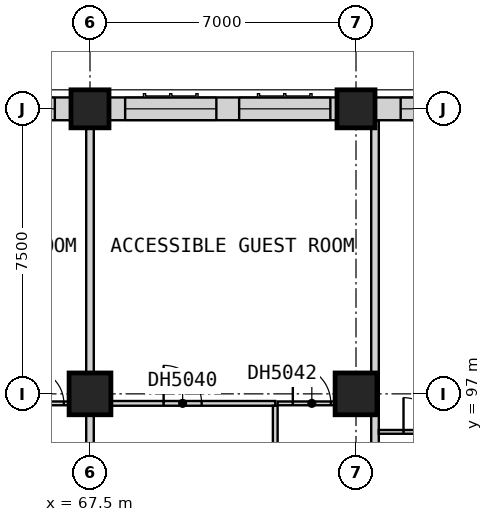
"""IFC4 building model, lengths in metres.
Left out: names, types, materials, properties, quantities, classifications, styles, units other than length and angle.
Written with IfcOpenShell. Run it as: python <this file> out.ifc"""

import sys

from ifc_helpers import new_model, si_unit, direction, frame, frame_2d, origin, origin_2d, place, context, subcontext, project, spatial, rectangle, extrude, element, fill, save


model = new_model("IFC4")
c1 = context("Model", 3, precision=1e-05, world=origin(), true_north=direction((0.0, 1.0)))
c2 = subcontext(c1, "Body", "Model", "MODEL_VIEW")
j1 = project(units=[si_unit("LENGTHUNIT", "METRE"), si_unit("PLANEANGLEUNIT", "RADIAN")], contexts=[c1])
p1 = place(None, origin())
s1 = spatial("IfcSite", under=j1, at=p1, CompositionType="ELEMENT")
p2 = place(p1, origin())
s2 = spatial("IfcBuilding", under=s1, at=p2, CompositionType="ELEMENT")
p3 = place(p2, frame((0.0, 0.0, 93.5)))
s3 = spatial("IfcBuildingStorey", under=s2, at=p3, CompositionType="ELEMENT", Elevation=93.5)
p4 = place(p3, frame((67.5, 97.0, 0.0), z_axis=(0.0, 0.0, 1.0), x_axis=(1.0, 0.0, 0.0)))
e1 = element("IfcColumn", 1, at=p4, inside=s3, PredefinedType="COLUMN", context=c2, shape_type="SweptSolid", body=[
    extrude(rectangle(XDim=1.1, YDim=1.1, at=origin_2d()), origin(), (0.0, 0.0, 1.0), 3.6),
])
p5 = place(p3, frame((67.5, 104.5, 0.0), z_axis=(0.0, 0.0, 1.0), x_axis=(1.0, 0.0, 0.0)))
e2 = element("IfcColumn", 2, at=p5, inside=s3, PredefinedType="COLUMN", context=c2, shape_type="SweptSolid", body=[
    extrude(rectangle(XDim=1.0, YDim=1.0, at=origin_2d()), origin(), (0.0, 0.0, 1.0), 3.6),
])
p6 = place(p3, frame((74.5, 97.0, 0.0), z_axis=(0.0, 0.0, 1.0), x_axis=(1.0, 0.0, 0.0)))
e3 = element("IfcColumn", 3, at=p6, inside=s3, PredefinedType="COLUMN", context=c2, shape_type="SweptSolid", body=[
    extrude(rectangle(XDim=1.1, YDim=1.1, at=origin_2d()), origin(), (0.0, 0.0, 1.0), 3.6),
])
p7 = place(p3, frame((74.5, 104.5, 0.0), z_axis=(0.0, 0.0, 1.0), x_axis=(1.0, 0.0, 0.0)))
e4 = element("IfcColumn", 4, at=p7, inside=s3, PredefinedType="COLUMN", context=c2, shape_type="SweptSolid", body=[
    extrude(rectangle(XDim=1.0, YDim=1.0, at=origin_2d()), origin(), (0.0, 0.0, 1.0), 3.6),
])
p8 = place(p3, frame((81.5, 104.5, 0.0), z_axis=(0.0, 0.0, 1.0), x_axis=(-1.0, 0.0, 0.0)))
e5 = element("IfcWall", 5, at=p8, inside=s3, PredefinedType="SOLIDWALL", context=c2, shape_type="SweptSolid", body=[
    extrude(rectangle(XDim=6.5, YDim=0.6, at=frame_2d((3.25, 0.0))), origin(), (0.0, 0.0, 1.0), 2.85),
])
p9 = place(p8, frame((3.425, 0.0, 0.8)))
e6 = element("IfcOpeningElement", 6, at=p9, cuts=e5, PredefinedType="OPENING", context=c2, shape_type="SweptSolid", body=[
    extrude(rectangle(XDim=2.4, YDim=1.8, at=frame_2d((1.2, 0.9))), frame((0.0, 0.31, 0.0), z_axis=(0.0, -1.0, 0.0), x_axis=(1.0, 0.0, 0.0)), (0.0, 0.0, 1.0), 0.62),
])
p10 = place(p8, frame((0.175, 0.0, 0.8)))
e7 = element("IfcOpeningElement", 7, at=p10, cuts=e5, PredefinedType="OPENING", context=c2, shape_type="SweptSolid", body=[
    extrude(rectangle(XDim=2.4, YDim=1.8, at=frame_2d((1.2, 0.9))), frame((0.0, 0.31, 0.0), z_axis=(0.0, -1.0, 0.0), x_axis=(1.0, 0.0, 0.0)), (0.0, 0.0, 1.0), 0.62),
])
p11 = place(p3, frame((74.0, 104.5, 0.0), z_axis=(0.0, 0.0, 1.0), x_axis=(-1.0, 0.0, 0.0)))
e8 = element("IfcWall", 8, at=p11, inside=s3, PredefinedType="SOLIDWALL", context=c2, shape_type="SweptSolid", body=[
    extrude(rectangle(XDim=6.0, YDim=0.6, at=frame_2d((3.0, 0.0))), origin(), (0.0, 0.0, 1.0), 2.85),
])
p12 = place(p11, frame((3.175, 0.0, 0.8)))
e9 = element("IfcOpeningElement", 9, at=p12, cuts=e8, PredefinedType="OPENING", context=c2, shape_type="SweptSolid", body=[
    extrude(rectangle(XDim=2.4, YDim=1.8, at=frame_2d((1.2, 0.9))), frame((0.0, 0.31, 0.0), z_axis=(0.0, -1.0, 0.0), x_axis=(1.0, 0.0, 0.0)), (0.0, 0.0, 1.0), 0.62),
])
p13 = place(p11, frame((0.175, 0.0, 0.8)))
e10 = element("IfcOpeningElement", 10, at=p13, cuts=e8, PredefinedType="OPENING", context=c2, shape_type="SweptSolid", body=[
    extrude(rectangle(XDim=2.4, YDim=1.8, at=frame_2d((1.2, 0.9))), frame((0.0, 0.31, 0.0), z_axis=(0.0, -1.0, 0.0), x_axis=(1.0, 0.0, 0.0)), (0.0, 0.0, 1.0), 0.62),
])
p14 = place(p3, frame((67.0, 104.5, 0.0), z_axis=(0.0, 0.0, 1.0), x_axis=(-1.0, 0.0, 0.0)))
e11 = element("IfcWall", 11, at=p14, inside=s3, PredefinedType="SOLIDWALL", context=c2, shape_type="SweptSolid", body=[
    extrude(rectangle(XDim=6.5, YDim=0.6, at=frame_2d((3.25, 0.0))), origin(), (0.0, 0.0, 1.0), 2.85),
])
p15 = place(p14, frame((3.675, 0.0, 0.8)))
e12 = element("IfcOpeningElement", 12, at=p15, cuts=e11, PredefinedType="OPENING", context=c2, shape_type="SweptSolid", body=[
    extrude(rectangle(XDim=2.4, YDim=1.8, at=frame_2d((1.2, 0.9))), frame((0.0, 0.31, 0.0), z_axis=(0.0, -1.0, 0.0), x_axis=(1.0, 0.0, 0.0)), (0.0, 0.0, 1.0), 0.62),
])
p16 = place(p14, frame((0.425, 0.0, 0.8)))
e13 = element("IfcOpeningElement", 13, at=p16, cuts=e11, PredefinedType="OPENING", context=c2, shape_type="SweptSolid", body=[
    extrude(rectangle(XDim=2.4, YDim=1.8, at=frame_2d((1.2, 0.9))), frame((0.0, 0.31, 0.0), z_axis=(0.0, -1.0, 0.0), x_axis=(1.0, 0.0, 0.0)), (0.0, 0.0, 1.0), 0.62),
])
p17 = place(p3, frame((67.5, 92.475, 0.0), z_axis=(0.0, 0.0, 1.0), x_axis=(0.0, 1.0, 0.0)))
e14 = element("IfcWall", 14, at=p17, inside=s3, PredefinedType="PARTITIONING", context=c2, shape_type="SweptSolid", body=[
    extrude(rectangle(XDim=12.525, YDim=0.2, at=frame_2d((6.262, 0.0))), origin(), (0.0, 0.0, 1.0), 3.35),
])
p18 = place(p3, frame((75.0, 92.475, 0.0), z_axis=(0.0, 0.0, 1.0), x_axis=(0.0, 1.0, 0.0)))
e15 = element("IfcWall", 15, at=p18, inside=s3, PredefinedType="PARTITIONING", context=c2, shape_type="SweptSolid", body=[
    extrude(rectangle(XDim=11.715, YDim=0.2, at=frame_2d((5.857, 0.0))), origin(), (0.0, 0.0, 1.0), 3.35),
])
p19 = place(p3, frame((75.1, 96.0, 0.0), z_axis=(0.0, 0.0, 1.0), x_axis=(1.0, 0.0, 0.0)))
e16 = element("IfcWall", 16, at=p19, inside=s3, PredefinedType="PARTITIONING", context=c2, shape_type="SweptSolid", body=[
    extrude(rectangle(XDim=7.35, YDim=0.1, at=frame_2d((3.675, 0.0))), origin(), (0.0, 0.0, 1.0), 3.35),
])
p20 = place(p19, frame((0.65, 0.0, 0.0)))
e17 = element("IfcOpeningElement", 17, at=p20, cuts=e16, PredefinedType="OPENING", context=c2, shape_type="SweptSolid", body=[
    extrude(rectangle(XDim=0.9, YDim=2.1, at=frame_2d((0.45, 1.05))), frame((0.0, 0.06, 0.0), z_axis=(0.0, -1.0, 0.0), x_axis=(1.0, 0.0, 0.0)), (0.0, 0.0, 1.0), 0.12),
])
p21 = place(p3, frame((65.688, 96.75, 0.0), z_axis=(0.0, 0.0, 1.0), x_axis=(1.0, 0.0, 0.0)))
e18 = element("IfcWall", 18, at=p21, inside=s3, PredefinedType="PARTITIONING", context=c2, shape_type="SweptSolid", body=[
    extrude(rectangle(XDim=1.712, YDim=0.1, at=frame_2d((0.856, 0.0))), origin(), (0.0, 0.0, 1.0), 3.35),
])
p22 = place(p21, frame((0.225, 0.0, 0.0)))
e19 = element("IfcOpeningElement", 19, at=p22, cuts=e18, PredefinedType="OPENING", context=c2, shape_type="SweptSolid", body=[
    extrude(rectangle(XDim=0.9, YDim=2.1, at=frame_2d((0.45, 1.05))), frame((0.0, 0.06, 0.0), z_axis=(0.0, -1.0, 0.0), x_axis=(1.0, 0.0, 0.0)), (0.0, 0.0, 1.0), 0.12),
])
p23 = place(p3, frame((72.438, 96.75, 0.0), z_axis=(0.0, 0.0, 1.0), x_axis=(1.0, 0.0, 0.0)))
e20 = element("IfcWall", 20, at=p23, inside=s3, PredefinedType="PARTITIONING", context=c2, shape_type="SweptSolid", body=[
    extrude(rectangle(XDim=2.462, YDim=0.1, at=frame_2d((1.231, 0.0))), origin(), (0.0, 0.0, 1.0), 3.35),
])
p24 = place(p23, frame((0.4, 0.0, 0.0)))
e21 = element("IfcOpeningElement", 21, at=p24, cuts=e20, PredefinedType="OPENING", context=c2, shape_type="SweptSolid", body=[
    extrude(rectangle(XDim=1.0, YDim=2.1, at=frame_2d((0.5, 1.05))), frame((0.0, 0.06, 0.0), z_axis=(0.0, -1.0, 0.0), x_axis=(1.0, 0.0, 0.0)), (0.0, 0.0, 1.0), 0.12),
])
p25 = place(p3, frame((67.6, 96.75, 0.0), z_axis=(0.0, 0.0, 1.0), x_axis=(1.0, 0.0, 0.0)))
e22 = element("IfcWall", 22, at=p25, inside=s3, PredefinedType="PARTITIONING", context=c2, shape_type="SweptSolid", body=[
    extrude(rectangle(XDim=4.775, YDim=0.125, at=frame_2d((2.387, 0.0))), origin(), (0.0, 0.0, 1.0), 3.35),
])
p26 = place(p25, frame((1.837, 0.0, 0.0)))
e23 = element("IfcOpeningElement", 23, at=p26, cuts=e22, PredefinedType="OPENING", context=c2, shape_type="SweptSolid", body=[
    extrude(rectangle(XDim=1.0, YDim=2.1, at=frame_2d((0.5, 1.05))), frame((0.0, 0.073, 0.0), z_axis=(0.0, -1.0, 0.0), x_axis=(1.0, 0.0, 0.0)), (0.0, 0.0, 1.0), 0.145),
])
p27 = place(p3, frame((72.375, 92.475, 0.0), z_axis=(0.0, 0.0, 1.0), x_axis=(0.0, 1.0, 0.0)))
e24 = element("IfcWall", 24, at=p27, inside=s3, PredefinedType="PARTITIONING", context=c2, shape_type="SweptSolid", body=[
    extrude(rectangle(XDim=4.212, YDim=0.125, at=frame_2d((2.106, 0.0))), origin(), (0.0, 0.0, 1.0), 3.35),
])
p28 = place(p9, origin())
e25 = element("IfcWindow", 25, at=p28, inside=s3, PartitioningType="SINGLE_PANEL", PredefinedType="WINDOW", context=c2, shape_type="SweptSolid", body=[
    extrude(rectangle(XDim=2.4, YDim=1.8, at=frame_2d((1.2, 0.9))), frame((0.0, -0.07, 0.0), z_axis=(0.0, -1.0, 0.0), x_axis=(1.0, 0.0, 0.0)), (0.0, 0.0, 1.0), 0.06),
])
fill(e6, e25)
p29 = place(p12, origin())
e26 = element("IfcWindow", 26, at=p29, inside=s3, PartitioningType="SINGLE_PANEL", PredefinedType="WINDOW", context=c2, shape_type="SweptSolid", body=[
    extrude(rectangle(XDim=2.4, YDim=1.8, at=frame_2d((1.2, 0.9))), frame((0.0, -0.07, 0.0), z_axis=(0.0, -1.0, 0.0), x_axis=(1.0, 0.0, 0.0)), (0.0, 0.0, 1.0), 0.06),
])
fill(e9, e26)
p30 = place(p13, origin())
e27 = element("IfcWindow", 27, at=p30, inside=s3, PartitioningType="SINGLE_PANEL", PredefinedType="WINDOW", context=c2, shape_type="SweptSolid", body=[
    extrude(rectangle(XDim=2.4, YDim=1.8, at=frame_2d((1.2, 0.9))), frame((0.0, -0.07, 0.0), z_axis=(0.0, -1.0, 0.0), x_axis=(1.0, 0.0, 0.0)), (0.0, 0.0, 1.0), 0.06),
])
fill(e10, e27)
p31 = place(p16, origin())
e28 = element("IfcWindow", 28, at=p31, inside=s3, PartitioningType="SINGLE_PANEL", PredefinedType="WINDOW", context=c2, shape_type="SweptSolid", body=[
    extrude(rectangle(XDim=2.4, YDim=1.8, at=frame_2d((1.2, 0.9))), frame((0.0, -0.07, 0.0), z_axis=(0.0, -1.0, 0.0), x_axis=(1.0, 0.0, 0.0)), (0.0, 0.0, 1.0), 0.06),
])
fill(e13, e28)
p32 = place(p22, origin())
e29 = element("IfcDoor", 29, at=p32, inside=s3, OperationType="SINGLE_SWING_RIGHT", PredefinedType="DOOR", context=c2, shape_type="SweptSolid", body=[
    extrude(rectangle(XDim=0.9, YDim=2.1, at=frame_2d((0.45, 1.05))), frame((0.0, 0.025, 0.0), z_axis=(0.0, -1.0, 0.0), x_axis=(1.0, 0.0, 0.0)), (0.0, 0.0, 1.0), 0.05),
])
fill(e19, e29)
p33 = place(p26, origin())
e30 = element("IfcDoor", 30, at=p33, inside=s3, OperationType="SINGLE_SWING_RIGHT", PredefinedType="DOOR", context=c2, shape_type="SweptSolid", body=[
    extrude(rectangle(XDim=1.0, YDim=2.1, at=frame_2d((0.5, 1.05))), frame((0.0, 0.025, 0.0), z_axis=(0.0, -1.0, 0.0), x_axis=(1.0, 0.0, 0.0)), (0.0, 0.0, 1.0), 0.05),
])
fill(e23, e30)
p34 = place(p24, origin())
e31 = element("IfcDoor", 31, at=p34, inside=s3, OperationType="SINGLE_SWING_RIGHT", PredefinedType="DOOR", context=c2, shape_type="SweptSolid", body=[
    extrude(rectangle(XDim=1.0, YDim=2.1, at=frame_2d((0.5, 1.05))), frame((0.0, 0.025, 0.0), z_axis=(0.0, -1.0, 0.0), x_axis=(1.0, 0.0, 0.0)), (0.0, 0.0, 1.0), 0.05),
])
fill(e21, e31)
p35 = place(p20, origin())
e32 = element("IfcDoor", 32, at=p35, inside=s3, OperationType="SINGLE_SWING_LEFT", PredefinedType="DOOR", context=c2, shape_type="SweptSolid", body=[
    extrude(rectangle(XDim=0.9, YDim=2.1, at=frame_2d((0.45, 1.05))), frame((0.0, 0.025, 0.0), z_axis=(0.0, -1.0, 0.0), x_axis=(1.0, 0.0, 0.0)), (0.0, 0.0, 1.0), 0.05),
])
fill(e17, e32)
save(model, sys.argv[1])
